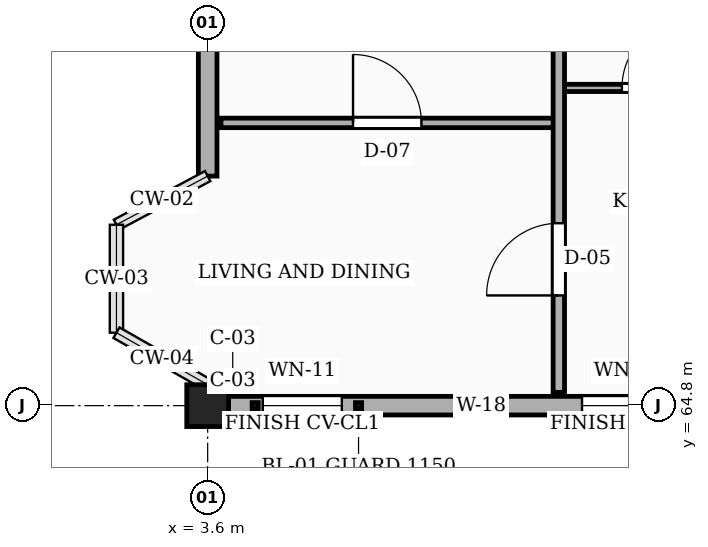
"""IFC4 building model, lengths in metres.
Left out: names, types, materials, properties, quantities, classifications, styles, units other than length and angle.
Written with IfcOpenShell. Run it as: python <this file> out.ifc"""

import sys

from ifc_helpers import new_model, si_unit, direction, frame, frame_2d, origin, origin_2d, place, context, subcontext, project, spatial, rectangle, extrude, element, fill, save


model = new_model("IFC4")
c1 = context("Model", 3, precision=1e-05, world=origin(), true_north=direction((0.0, 1.0)))
c2 = subcontext(c1, "Body", "Model", "MODEL_VIEW")
j1 = project(units=[si_unit("LENGTHUNIT", "METRE"), si_unit("PLANEANGLEUNIT", "RADIAN")], contexts=[c1])
p1 = place(None, origin())
s1 = spatial("IfcSite", under=j1, at=p1, CompositionType="ELEMENT")
p2 = place(p1, origin())
s2 = spatial("IfcBuilding", under=s1, at=p2, CompositionType="ELEMENT")
p3 = place(p2, frame((0.0, 0.0, 20.25)))
s3 = spatial("IfcBuildingStorey", under=s2, at=p3, CompositionType="ELEMENT", Elevation=20.25)
p4 = place(p3, frame((3.6, 64.8, 0.0), z_axis=(0.0, 0.0, 1.0), x_axis=(1.0, 0.0, 0.0)))
e1 = element("IfcColumn", 1, at=p4, inside=s3, PredefinedType="COLUMN", context=c2, shape_type="SweptSolid", body=[
    extrude(rectangle(XDim=0.55, YDim=0.55, at=origin_2d()), origin(), (0.0, 0.0, 1.0), 3.15),
])
p5 = place(p3, frame((3.875, 64.8, 0.0), z_axis=(0.0, 0.0, 1.0), x_axis=(1.0, 0.0, 0.0)))
e2 = element("IfcWall", 2, at=p5, inside=s3, PredefinedType="SOLIDWALL", context=c2, shape_type="SweptSolid", body=[
    extrude(rectangle(XDim=6.65, YDim=0.245, at=frame_2d((3.325, 0.0))), origin(), (0.0, 0.0, 1.0), 2.48),
])
p6 = place(p5, frame((0.45, 0.0, 0.78)))
e3 = element("IfcOpeningElement", 3, at=p6, cuts=e2, PredefinedType="OPENING", context=c2, shape_type="SweptSolid", body=[
    extrude(rectangle(XDim=1.04, YDim=1.26, at=frame_2d((0.52, 0.63))), frame((0.0, 0.133, 0.0), z_axis=(0.0, -1.0, 0.0), x_axis=(1.0, 0.0, 0.0)), (0.0, 0.0, 1.0), 0.265),
])
p7 = place(p5, frame((4.65, 0.0, 0.78)))
e4 = element("IfcOpeningElement", 4, at=p7, cuts=e2, PredefinedType="OPENING", context=c2, shape_type="SweptSolid", body=[
    extrude(rectangle(XDim=1.2, YDim=1.26, at=frame_2d((0.6, 0.63))), frame((0.0, 0.133, 0.0), z_axis=(0.0, -1.0, 0.0), x_axis=(1.0, 0.0, 0.0)), (0.0, 0.0, 1.0), 0.265),
])
p8 = place(p3, frame((3.6, 71.725, 0.0), z_axis=(0.0, 0.0, 1.0), x_axis=(0.0, -1.0, 0.0)))
e5 = element("IfcWall", 5, at=p8, inside=s3, PredefinedType="SOLIDWALL", context=c2, shape_type="SweptSolid", body=[
    extrude(rectangle(XDim=3.905, YDim=0.245, at=frame_2d((1.953, 0.0))), origin(), (0.0, 0.0, 1.0), 2.48),
])
p9 = place(p8, frame((1.157, 0.0, 0.78)))
e6 = element("IfcOpeningElement", 6, at=p9, cuts=e5, PredefinedType="OPENING", context=c2, shape_type="SweptSolid", body=[
    extrude(rectangle(XDim=1.0, YDim=1.15, at=frame_2d((0.5, 0.575))), frame((0.0, 0.133, 0.0), z_axis=(0.0, -1.0, 0.0), x_axis=(1.0, 0.0, 0.0)), (0.0, 0.0, 1.0), 0.265),
])
p10 = place(p3, frame((3.775, 68.52, 0.0), z_axis=(0.0, 0.0, 1.0), x_axis=(1.0, 0.0, 0.0)))
e7 = element("IfcWall", 7, at=p10, inside=s3, PredefinedType="PARTITIONING", context=c2, shape_type="SweptSolid", body=[
    extrude(rectangle(XDim=4.375, YDim=0.125, at=frame_2d((2.188, 0.0))), origin(), (0.0, 0.0, 1.0), 2.345),
])
p11 = place(p10, frame((1.738, 0.0, 0.0)))
e8 = element("IfcOpeningElement", 8, at=p11, cuts=e7, PredefinedType="OPENING", context=c2, shape_type="SweptSolid", body=[
    extrude(rectangle(XDim=0.9, YDim=2.1, at=frame_2d((0.45, 1.05))), frame((0.0, 0.073, 0.0), z_axis=(0.0, -1.0, 0.0), x_axis=(1.0, 0.0, 0.0)), (0.0, 0.0, 1.0), 0.145),
])
p12 = place(p3, frame((8.29, 68.98, 0.0), z_axis=(0.0, 0.0, 1.0), x_axis=(1.0, 0.0, 0.0)))
e9 = element("IfcWall", 9, at=p12, inside=s3, PredefinedType="PARTITIONING", context=c2, shape_type="SweptSolid", body=[
    extrude(rectangle(XDim=2.42, YDim=0.095, at=frame_2d((1.21, 0.0))), origin(), (0.0, 0.0, 1.0), 2.345),
])
p13 = place(p12, frame((0.76, 0.0, 0.0)))
e10 = element("IfcOpeningElement", 10, at=p13, cuts=e9, PredefinedType="OPENING", context=c2, shape_type="SweptSolid", body=[
    extrude(rectangle(XDim=0.9, YDim=2.05, at=frame_2d((0.45, 1.025))), frame((0.0, 0.058, 0.0), z_axis=(0.0, -1.0, 0.0), x_axis=(1.0, 0.0, 0.0)), (0.0, 0.0, 1.0), 0.115),
])
p14 = place(p3, frame((8.22, 64.975, 0.0), z_axis=(0.0, 0.0, 1.0), x_axis=(0.0, 1.0, 0.0)))
e11 = element("IfcWall", 11, at=p14, inside=s3, PredefinedType="PARTITIONING", context=c2, shape_type="SweptSolid", body=[
    extrude(rectangle(XDim=6.885, YDim=0.15, at=frame_2d((3.442, 0.0))), origin(), (0.0, 0.0, 1.0), 2.345),
])
p15 = place(p14, frame((1.275, 0.0, 0.0)))
e12 = element("IfcOpeningElement", 12, at=p15, cuts=e11, PredefinedType="OPENING", context=c2, shape_type="SweptSolid", body=[
    extrude(rectangle(XDim=0.95, YDim=2.1, at=frame_2d((0.475, 1.05))), frame((0.0, 0.085, 0.0), z_axis=(0.0, -1.0, 0.0), x_axis=(1.0, 0.0, 0.0)), (0.0, 0.0, 1.0), 0.17),
])
p16 = place(p6, origin())
e13 = element("IfcWindow", 13, at=p16, inside=s3, PartitioningType="SINGLE_PANEL", PredefinedType="WINDOW", context=c2, shape_type="SweptSolid", body=[
    extrude(rectangle(XDim=1.04, YDim=1.26, at=frame_2d((0.52, 0.63))), frame((0.0, 0.03, 0.0), z_axis=(0.0, -1.0, 0.0), x_axis=(1.0, 0.0, 0.0)), (0.0, 0.0, 1.0), 0.06),
])
fill(e3, e13)
p17 = place(p7, origin())
e14 = element("IfcWindow", 14, at=p17, inside=s3, PartitioningType="SINGLE_PANEL", PredefinedType="WINDOW", context=c2, shape_type="SweptSolid", body=[
    extrude(rectangle(XDim=1.2, YDim=1.26, at=frame_2d((0.6, 0.63))), frame((0.0, 0.03, 0.0), z_axis=(0.0, -1.0, 0.0), x_axis=(1.0, 0.0, 0.0)), (0.0, 0.0, 1.0), 0.06),
])
fill(e4, e14)
p18 = place(p11, origin())
e15 = element("IfcDoor", 15, at=p18, inside=s3, OperationType="SINGLE_SWING_LEFT", PredefinedType="DOOR", context=c2, shape_type="SweptSolid", body=[
    extrude(rectangle(XDim=0.9, YDim=2.1, at=frame_2d((0.45, 1.05))), frame((0.0, 0.025, 0.0), z_axis=(0.0, -1.0, 0.0), x_axis=(1.0, 0.0, 0.0)), (0.0, 0.0, 1.0), 0.05),
])
fill(e8, e15)
p19 = place(p13, origin())
e16 = element("IfcDoor", 16, at=p19, inside=s3, OperationType="SINGLE_SWING_RIGHT", PredefinedType="DOOR", context=c2, shape_type="SweptSolid", body=[
    extrude(rectangle(XDim=0.9, YDim=2.05, at=frame_2d((0.45, 1.025))), frame((0.0, 0.025, 0.0), z_axis=(0.0, -1.0, 0.0), x_axis=(1.0, 0.0, 0.0)), (0.0, 0.0, 1.0), 0.05),
])
fill(e10, e16)
p20 = place(p15, origin())
e17 = element("IfcDoor", 17, at=p20, inside=s3, OperationType="SINGLE_SWING_LEFT", PredefinedType="DOOR", context=c2, shape_type="SweptSolid", body=[
    extrude(rectangle(XDim=0.95, YDim=2.1, at=frame_2d((0.475, 1.05))), frame((0.0, 0.025, 0.0), z_axis=(0.0, -1.0, 0.0), x_axis=(1.0, 0.0, 0.0)), (0.0, 0.0, 1.0), 0.05),
])
fill(e12, e17)
save(model, sys.argv[1])
